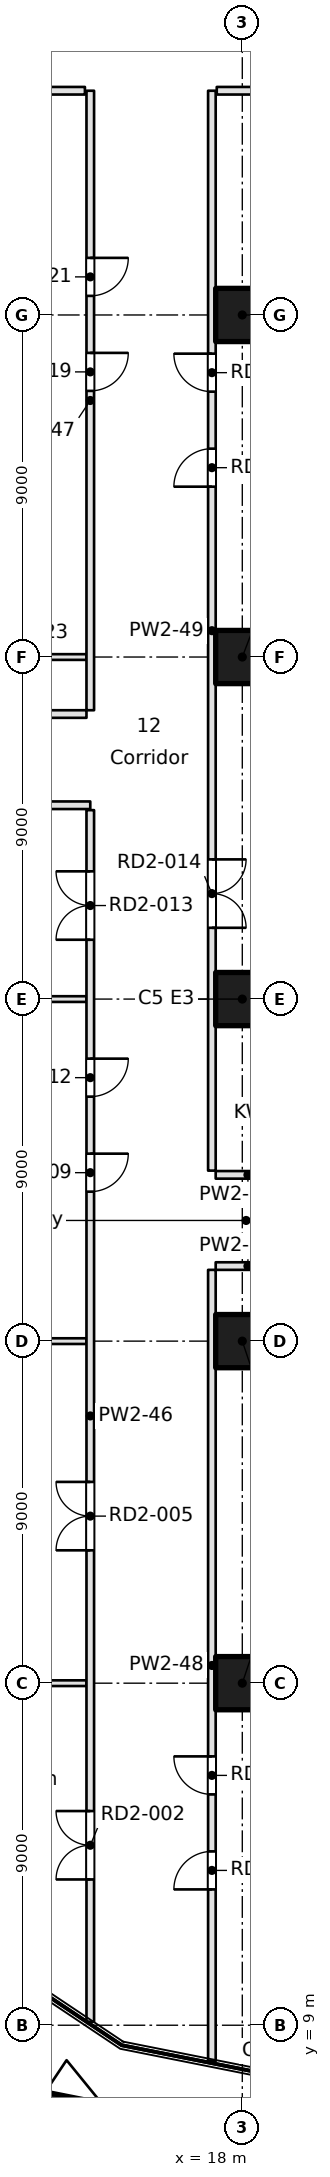
"""IFC4 building model, lengths in metres.
Left out: names, types, materials, properties, quantities, classifications, styles, units other than length and angle.
Written with IfcOpenShell. Run it as: python <this file> out.ifc"""

import sys

from ifc_helpers import new_model, si_unit, direction, frame, frame_2d, origin, origin_2d, place, context, subcontext, project, spatial, rectangle, extrude, element, fill, save


model = new_model("IFC4")
c1 = context("Model", 3, precision=1e-05, world=origin(), true_north=direction((0.0, 1.0)))
c2 = subcontext(c1, "Body", "Model", "MODEL_VIEW")
j1 = project(units=[si_unit("LENGTHUNIT", "METRE"), si_unit("PLANEANGLEUNIT", "RADIAN")], contexts=[c1])
p1 = place(None, origin())
s1 = spatial("IfcSite", under=j1, at=p1, CompositionType="ELEMENT")
p2 = place(p1, origin())
s2 = spatial("IfcBuilding", under=s1, at=p2, CompositionType="ELEMENT")
p3 = place(p2, frame((0.0, 0.0, 35.8)))
s3 = spatial("IfcBuildingStorey", under=s2, at=p3, CompositionType="ELEMENT", Elevation=35.8)
p4 = place(p3, frame((13.89, 6.213, 0.0), z_axis=(0.0, 0.0, 1.0), x_axis=(-0.980785280403, 0.195090322016, 0.0)))
e1 = element("IfcColumn", 1, at=p4, inside=s3, PredefinedType="COLUMN", context=c2, shape_type="SweptSolid", body=[
    extrude(rectangle(XDim=2.4, YDim=1.6, at=origin_2d()), origin(), (0.0, 0.0, 1.0), 3.7),
])
for number, where, z_axis, x_axis in (
    (2, (18.0, 18.0, 0.0), (0.0, 0.0, 1.0), (1.0, 0.0, 0.0)),
    (3, (18.0, 27.0, 0.0), (0.0, 0.0, 1.0), (1.0, 0.0, 0.0)),
    (4, (18.0, 36.0, 0.0), (0.0, 0.0, 1.0), (1.0, 0.0, 0.0)),
    (5, (18.0, 45.0, 0.0), (0.0, 0.0, 1.0), (1.0, 0.0, 0.0)),
    (6, (18.0, 54.0, 0.0), (0.0, 0.0, 1.0), (1.0, 0.0, 0.0)),
):
    element("IfcColumn", number, at=place(p3, frame(where, z_axis=z_axis, x_axis=x_axis)), inside=s3, PredefinedType="COLUMN", context=c2, shape_type="SweptSolid", body=[
        extrude(rectangle(XDim=1.4, YDim=1.4, at=origin_2d()), origin(), (0.0, 0.0, 1.0), 3.7),
    ])
for number, where, z_axis, x_axis in (
    (7, (9.7, 18.0, 0.0), (0.0, 0.0, 1.0), (1.0, 0.0, 0.0)),
    (8, (9.7, 27.0, 0.0), (0.0, 0.0, 1.0), (1.0, 0.0, 0.0)),
):
    element("IfcWall", number, at=place(p3, frame(where, z_axis=z_axis, x_axis=x_axis)), inside=s3, PredefinedType="PARTITIONING", context=c2, shape_type="SweptSolid", body=[
        extrude(rectangle(XDim=4.2, YDim=0.15, at=frame_2d((2.1, 0.0))), origin(), (0.0, 0.0, 1.0), 3.3),
    ])
for number, where, z_axis, x_axis in (
    (9, (18.996, 28.975, 0.0), (0.0, 0.0, 1.0), (-1.0, 0.0, 0.0)),
    (10, (17.3, 31.375, 0.0), (0.0, 0.0, 1.0), (1.0, 0.0, 0.0)),
):
    element("IfcWall", number, at=place(p3, frame(where, z_axis=z_axis, x_axis=x_axis)), inside=s3, PredefinedType="PARTITIONING", context=c2, shape_type="SweptSolid", body=[
        extrude(rectangle(XDim=1.696, YDim=0.2, at=frame_2d((0.848, 0.0))), origin(), (0.0, 0.0, 1.0), 3.3),
    ])
p5 = place(p3, frame((9.7, 36.0, 0.0), z_axis=(0.0, 0.0, 1.0), x_axis=(1.0, 0.0, 0.0)))
e11 = element("IfcWall", 11, at=p5, inside=s3, PredefinedType="PARTITIONING", context=c2, shape_type="SweptSolid", body=[
    extrude(rectangle(XDim=4.2, YDim=0.15, at=frame_2d((2.1, 0.0))), origin(), (0.0, 0.0, 1.0), 3.3),
])
p6 = place(p3, frame((14.0, 41.1, 0.0), z_axis=(0.0, 0.0, 1.0), x_axis=(-1.0, 0.0, 0.0)))
e12 = element("IfcWall", 12, at=p6, inside=s3, PredefinedType="PARTITIONING", context=c2, shape_type="SweptSolid", body=[
    extrude(rectangle(XDim=4.925, YDim=0.2, at=frame_2d((2.462, 0.0))), origin(), (0.0, 0.0, 1.0), 3.3),
])
p7 = place(p3, frame((6.1, 43.5, 0.0), z_axis=(0.0, 0.0, 1.0), x_axis=(1.0, 0.0, 0.0)))
e13 = element("IfcWall", 13, at=p7, inside=s3, PredefinedType="PARTITIONING", context=c2, shape_type="SweptSolid", body=[
    extrude(rectangle(XDim=7.8, YDim=0.2, at=frame_2d((3.9, 0.0))), origin(), (0.0, 0.0, 1.0), 3.3),
])
p8 = place(p7, frame((4.5, 0.0, 0.0)))
e14 = element("IfcOpeningElement", 14, at=p8, cuts=e13, PredefinedType="OPENING", context=c2, shape_type="SweptSolid", body=[
    extrude(rectangle(XDim=1.8, YDim=2.1, at=frame_2d((0.9, 1.05))), frame((0.0, 0.1, 0.0), z_axis=(0.0, -1.0, 0.0), x_axis=(1.0, 0.0, 0.0)), (0.0, 0.0, 1.0), 0.2),
])
p9 = place(p3, frame((9.7, 45.0, 0.0), z_axis=(0.0, 0.0, 1.0), x_axis=(1.0, 0.0, 0.0)))
e15 = element("IfcWall", 15, at=p9, inside=s3, PredefinedType="PARTITIONING", context=c2, shape_type="SweptSolid", body=[
    extrude(rectangle(XDim=4.2, YDim=0.15, at=frame_2d((2.1, 0.0))), origin(), (0.0, 0.0, 1.0), 3.3),
])
p10 = place(p3, frame((13.859, 59.9, 0.0), z_axis=(0.0, 0.0, 1.0), x_axis=(-1.0, 0.0, 0.0)))
e16 = element("IfcWall", 16, at=p10, inside=s3, PredefinedType="PARTITIONING", context=c2, shape_type="SweptSolid", body=[
    extrude(rectangle(XDim=4.955, YDim=0.2, at=frame_2d((2.478, 0.0))), origin(), (0.0, 0.0, 1.0), 3.3),
])
p11 = place(p3, frame((31.698, 59.9, 0.0), z_axis=(0.0, 0.0, 1.0), x_axis=(-1.0, 0.0, 0.0)))
e17 = element("IfcWall", 17, at=p11, inside=s3, PredefinedType="PARTITIONING", context=c2, shape_type="SweptSolid", body=[
    extrude(rectangle(XDim=14.37, YDim=0.2, at=frame_2d((7.185, 0.0))), origin(), (0.0, 0.0, 1.0), 3.3),
])
p12 = place(p3, frame((14.0, 9.092, 0.0), z_axis=(0.0, 0.0, 1.0), x_axis=(0.0, 1.0, 0.0)))
e18 = element("IfcWall", 18, at=p12, inside=s3, PredefinedType="PARTITIONING", context=c2, shape_type="SweptSolid", body=[
    extrude(rectangle(XDim=31.88, YDim=0.2, at=frame_2d((15.94, 0.0))), origin(), (0.0, 0.0, 1.0), 3.3),
])
p13 = place(p12, frame((3.744, 0.0, 0.0)))
e19 = element("IfcOpeningElement", 19, at=p13, cuts=e18, PredefinedType="OPENING", context=c2, shape_type="SweptSolid", body=[
    extrude(rectangle(XDim=1.8, YDim=2.1, at=frame_2d((0.9, 1.05))), frame((0.0, 0.1, 0.0), z_axis=(0.0, -1.0, 0.0), x_axis=(1.0, 0.0, 0.0)), (0.0, 0.0, 1.0), 0.2),
])
p14 = place(p12, frame((12.404, 0.0, 0.0)))
e20 = element("IfcOpeningElement", 20, at=p14, cuts=e18, PredefinedType="OPENING", context=c2, shape_type="SweptSolid", body=[
    extrude(rectangle(XDim=1.8, YDim=2.1, at=frame_2d((0.9, 1.05))), frame((0.0, 0.1, 0.0), z_axis=(0.0, -1.0, 0.0), x_axis=(1.0, 0.0, 0.0)), (0.0, 0.0, 1.0), 0.2),
])
p15 = place(p12, frame((21.841, 0.0, 0.0)))
e21 = element("IfcOpeningElement", 21, at=p15, cuts=e18, PredefinedType="OPENING", context=c2, shape_type="SweptSolid", body=[
    extrude(rectangle(XDim=1.0, YDim=2.1, at=frame_2d((0.5, 1.05))), frame((0.0, 0.1, 0.0), z_axis=(0.0, -1.0, 0.0), x_axis=(1.0, 0.0, 0.0)), (0.0, 0.0, 1.0), 0.2),
])
p16 = place(p12, frame((24.341, 0.0, 0.0)))
e22 = element("IfcOpeningElement", 22, at=p16, cuts=e18, PredefinedType="OPENING", context=c2, shape_type="SweptSolid", body=[
    extrude(rectangle(XDim=1.0, YDim=2.1, at=frame_2d((0.5, 1.05))), frame((0.0, 0.1, 0.0), z_axis=(0.0, -1.0, 0.0), x_axis=(1.0, 0.0, 0.0)), (0.0, 0.0, 1.0), 0.2),
])
p17 = place(p12, frame((28.469, 0.0, 0.0)))
e23 = element("IfcOpeningElement", 23, at=p17, cuts=e18, PredefinedType="OPENING", context=c2, shape_type="SweptSolid", body=[
    extrude(rectangle(XDim=1.8, YDim=2.1, at=frame_2d((0.9, 1.05))), frame((0.0, 0.1, 0.0), z_axis=(0.0, -1.0, 0.0), x_axis=(1.0, 0.0, 0.0)), (0.0, 0.0, 1.0), 0.2),
])
p18 = place(p3, frame((14.0, 43.6, 0.0), z_axis=(0.0, 0.0, 1.0), x_axis=(0.0, 1.0, 0.0)))
e24 = element("IfcWall", 24, at=p18, inside=s3, PredefinedType="PARTITIONING", context=c2, shape_type="SweptSolid", body=[
    extrude(rectangle(XDim=16.3, YDim=0.2, at=frame_2d((8.15, 0.0))), origin(), (0.0, 0.0, 1.0), 3.3),
])
p19 = place(p18, frame((8.402, 0.0, 0.0)))
e25 = element("IfcOpeningElement", 25, at=p19, cuts=e24, PredefinedType="OPENING", context=c2, shape_type="SweptSolid", body=[
    extrude(rectangle(XDim=1.0, YDim=2.1, at=frame_2d((0.5, 1.05))), frame((0.0, 0.1, 0.0), z_axis=(0.0, -1.0, 0.0), x_axis=(1.0, 0.0, 0.0)), (0.0, 0.0, 1.0), 0.2),
])
p20 = place(p18, frame((10.902, 0.0, 0.0)))
e26 = element("IfcOpeningElement", 26, at=p20, cuts=e24, PredefinedType="OPENING", context=c2, shape_type="SweptSolid", body=[
    extrude(rectangle(XDim=1.0, YDim=2.1, at=frame_2d((0.5, 1.05))), frame((0.0, 0.1, 0.0), z_axis=(0.0, -1.0, 0.0), x_axis=(1.0, 0.0, 0.0)), (0.0, 0.0, 1.0), 0.2),
])
p21 = place(p3, frame((17.2, 28.875, 0.0), z_axis=(0.0, 0.0, 1.0), x_axis=(0.0, -1.0, 0.0)))
e27 = element("IfcWall", 27, at=p21, inside=s3, PredefinedType="PARTITIONING", context=c2, shape_type="SweptSolid", body=[
    extrude(rectangle(XDim=20.818, YDim=0.2, at=frame_2d((10.409, 0.0))), origin(), (0.0, 0.0, 1.0), 3.3),
])
p22 = place(p21, frame((15.302, 0.0, 0.0)))
e28 = element("IfcOpeningElement", 28, at=p22, cuts=e27, PredefinedType="OPENING", context=c2, shape_type="SweptSolid", body=[
    extrude(rectangle(XDim=1.0, YDim=2.1, at=frame_2d((0.5, 1.05))), frame((0.0, 0.1, 0.0), z_axis=(0.0, -1.0, 0.0), x_axis=(1.0, 0.0, 0.0)), (0.0, 0.0, 1.0), 0.2),
])
p23 = place(p21, frame((12.802, 0.0, 0.0)))
e29 = element("IfcOpeningElement", 29, at=p23, cuts=e27, PredefinedType="OPENING", context=c2, shape_type="SweptSolid", body=[
    extrude(rectangle(XDim=1.0, YDim=2.1, at=frame_2d((0.5, 1.05))), frame((0.0, 0.1, 0.0), z_axis=(0.0, -1.0, 0.0), x_axis=(1.0, 0.0, 0.0)), (0.0, 0.0, 1.0), 0.2),
])
p24 = place(p3, frame((17.2, 59.9, 0.0), z_axis=(0.0, 0.0, 1.0), x_axis=(0.0, -1.0, 0.0)))
e30 = element("IfcWall", 30, at=p24, inside=s3, PredefinedType="PARTITIONING", context=c2, shape_type="SweptSolid", body=[
    extrude(rectangle(XDim=28.414, YDim=0.2, at=frame_2d((14.207, 0.0))), origin(), (0.0, 0.0, 1.0), 3.3),
])
p25 = place(p24, frame((20.225, 0.0, 0.0)))
e31 = element("IfcOpeningElement", 31, at=p25, cuts=e30, PredefinedType="OPENING", context=c2, shape_type="SweptSolid", body=[
    extrude(rectangle(XDim=1.8, YDim=2.1, at=frame_2d((0.9, 1.05))), frame((0.0, 0.1, 0.0), z_axis=(0.0, -1.0, 0.0), x_axis=(1.0, 0.0, 0.0)), (0.0, 0.0, 1.0), 0.2),
])
p26 = place(p24, frame((9.418, 0.0, 0.0)))
e32 = element("IfcOpeningElement", 32, at=p26, cuts=e30, PredefinedType="OPENING", context=c2, shape_type="SweptSolid", body=[
    extrude(rectangle(XDim=1.0, YDim=2.1, at=frame_2d((0.5, 1.05))), frame((0.0, 0.1, 0.0), z_axis=(0.0, -1.0, 0.0), x_axis=(1.0, 0.0, 0.0)), (0.0, 0.0, 1.0), 0.2),
])
p27 = place(p24, frame((6.918, 0.0, 0.0)))
e33 = element("IfcOpeningElement", 33, at=p27, cuts=e30, PredefinedType="OPENING", context=c2, shape_type="SweptSolid", body=[
    extrude(rectangle(XDim=1.0, YDim=2.1, at=frame_2d((0.5, 1.05))), frame((0.0, 0.1, 0.0), z_axis=(0.0, -1.0, 0.0), x_axis=(1.0, 0.0, 0.0)), (0.0, 0.0, 1.0), 0.2),
])
p28 = place(p22, frame((1.0, 0.0, 0.0), z_axis=(0.0, 0.0, 1.0), x_axis=(-1.0, 0.0, 0.0)))
e34 = element("IfcDoor", 34, at=p28, inside=s3, OperationType="SINGLE_SWING_LEFT", PredefinedType="DOOR", context=c2, shape_type="SweptSolid", body=[
    extrude(rectangle(XDim=1.0, YDim=2.1, at=frame_2d((0.5, 1.05))), frame((0.0, 0.025, 0.0), z_axis=(0.0, -1.0, 0.0), x_axis=(1.0, 0.0, 0.0)), (0.0, 0.0, 1.0), 0.05),
])
fill(e28, e34)
p29 = place(p13, origin())
e35 = element("IfcDoor", 35, at=p29, inside=s3, OperationType="DOUBLE_DOOR_SINGLE_SWING", PredefinedType="DOOR", context=c2, shape_type="SweptSolid", body=[
    extrude(rectangle(XDim=1.8, YDim=2.1, at=frame_2d((0.9, 1.05))), frame((0.0, 0.025, 0.0), z_axis=(0.0, -1.0, 0.0), x_axis=(1.0, 0.0, 0.0)), (0.0, 0.0, 1.0), 0.05),
])
fill(e19, e35)
p30 = place(p23, frame((1.0, 0.0, 0.0), z_axis=(0.0, 0.0, 1.0), x_axis=(-1.0, 0.0, 0.0)))
e36 = element("IfcDoor", 36, at=p30, inside=s3, OperationType="SINGLE_SWING_RIGHT", PredefinedType="DOOR", context=c2, shape_type="SweptSolid", body=[
    extrude(rectangle(XDim=1.0, YDim=2.1, at=frame_2d((0.5, 1.05))), frame((0.0, 0.025, 0.0), z_axis=(0.0, -1.0, 0.0), x_axis=(1.0, 0.0, 0.0)), (0.0, 0.0, 1.0), 0.05),
])
fill(e29, e36)
p31 = place(p14, origin())
e37 = element("IfcDoor", 37, at=p31, inside=s3, OperationType="DOUBLE_DOOR_SINGLE_SWING", PredefinedType="DOOR", context=c2, shape_type="SweptSolid", body=[
    extrude(rectangle(XDim=1.8, YDim=2.1, at=frame_2d((0.9, 1.05))), frame((0.0, 0.025, 0.0), z_axis=(0.0, -1.0, 0.0), x_axis=(1.0, 0.0, 0.0)), (0.0, 0.0, 1.0), 0.05),
])
fill(e20, e37)
p32 = place(p15, frame((1.0, 0.0, 0.0), z_axis=(0.0, 0.0, 1.0), x_axis=(-1.0, 0.0, 0.0)))
e38 = element("IfcDoor", 38, at=p32, inside=s3, OperationType="SINGLE_SWING_LEFT", PredefinedType="DOOR", context=c2, shape_type="SweptSolid", body=[
    extrude(rectangle(XDim=1.0, YDim=2.1, at=frame_2d((0.5, 1.05))), frame((0.0, 0.025, 0.0), z_axis=(0.0, -1.0, 0.0), x_axis=(1.0, 0.0, 0.0)), (0.0, 0.0, 1.0), 0.05),
])
fill(e21, e38)
p33 = place(p16, frame((1.0, 0.0, 0.0), z_axis=(0.0, 0.0, 1.0), x_axis=(-1.0, 0.0, 0.0)))
e39 = element("IfcDoor", 39, at=p33, inside=s3, OperationType="SINGLE_SWING_LEFT", PredefinedType="DOOR", context=c2, shape_type="SweptSolid", body=[
    extrude(rectangle(XDim=1.0, YDim=2.1, at=frame_2d((0.5, 1.05))), frame((0.0, 0.025, 0.0), z_axis=(0.0, -1.0, 0.0), x_axis=(1.0, 0.0, 0.0)), (0.0, 0.0, 1.0), 0.05),
])
fill(e22, e39)
p34 = place(p17, origin())
e40 = element("IfcDoor", 40, at=p34, inside=s3, OperationType="DOUBLE_DOOR_SINGLE_SWING", PredefinedType="DOOR", context=c2, shape_type="SweptSolid", body=[
    extrude(rectangle(XDim=1.8, YDim=2.1, at=frame_2d((0.9, 1.05))), frame((0.0, 0.025, 0.0), z_axis=(0.0, -1.0, 0.0), x_axis=(1.0, 0.0, 0.0)), (0.0, 0.0, 1.0), 0.05),
])
fill(e23, e40)
p35 = place(p25, origin())
e41 = element("IfcDoor", 41, at=p35, inside=s3, OperationType="DOUBLE_DOOR_SINGLE_SWING", PredefinedType="DOOR", context=c2, shape_type="SweptSolid", body=[
    extrude(rectangle(XDim=1.8, YDim=2.1, at=frame_2d((0.9, 1.05))), frame((0.0, 0.025, 0.0), z_axis=(0.0, -1.0, 0.0), x_axis=(1.0, 0.0, 0.0)), (0.0, 0.0, 1.0), 0.05),
])
fill(e31, e41)
p36 = place(p26, frame((1.0, 0.0, 0.0), z_axis=(0.0, 0.0, 1.0), x_axis=(-1.0, 0.0, 0.0)))
e42 = element("IfcDoor", 42, at=p36, inside=s3, OperationType="SINGLE_SWING_LEFT", PredefinedType="DOOR", context=c2, shape_type="SweptSolid", body=[
    extrude(rectangle(XDim=1.0, YDim=2.1, at=frame_2d((0.5, 1.05))), frame((0.0, 0.025, 0.0), z_axis=(0.0, -1.0, 0.0), x_axis=(1.0, 0.0, 0.0)), (0.0, 0.0, 1.0), 0.05),
])
fill(e32, e42)
p37 = place(p19, frame((1.0, 0.0, 0.0), z_axis=(0.0, 0.0, 1.0), x_axis=(-1.0, 0.0, 0.0)))
e43 = element("IfcDoor", 43, at=p37, inside=s3, OperationType="SINGLE_SWING_LEFT", PredefinedType="DOOR", context=c2, shape_type="SweptSolid", body=[
    extrude(rectangle(XDim=1.0, YDim=2.1, at=frame_2d((0.5, 1.05))), frame((0.0, 0.025, 0.0), z_axis=(0.0, -1.0, 0.0), x_axis=(1.0, 0.0, 0.0)), (0.0, 0.0, 1.0), 0.05),
])
fill(e25, e43)
p38 = place(p27, frame((1.0, 0.0, 0.0), z_axis=(0.0, 0.0, 1.0), x_axis=(-1.0, 0.0, 0.0)))
e44 = element("IfcDoor", 44, at=p38, inside=s3, OperationType="SINGLE_SWING_RIGHT", PredefinedType="DOOR", context=c2, shape_type="SweptSolid", body=[
    extrude(rectangle(XDim=1.0, YDim=2.1, at=frame_2d((0.5, 1.05))), frame((0.0, 0.025, 0.0), z_axis=(0.0, -1.0, 0.0), x_axis=(1.0, 0.0, 0.0)), (0.0, 0.0, 1.0), 0.05),
])
fill(e33, e44)
p39 = place(p20, frame((1.0, 0.0, 0.0), z_axis=(0.0, 0.0, 1.0), x_axis=(-1.0, 0.0, 0.0)))
e45 = element("IfcDoor", 45, at=p39, inside=s3, OperationType="SINGLE_SWING_LEFT", PredefinedType="DOOR", context=c2, shape_type="SweptSolid", body=[
    extrude(rectangle(XDim=1.0, YDim=2.1, at=frame_2d((0.5, 1.05))), frame((0.0, 0.025, 0.0), z_axis=(0.0, -1.0, 0.0), x_axis=(1.0, 0.0, 0.0)), (0.0, 0.0, 1.0), 0.05),
])
fill(e26, e45)
save(model, sys.argv[1])
